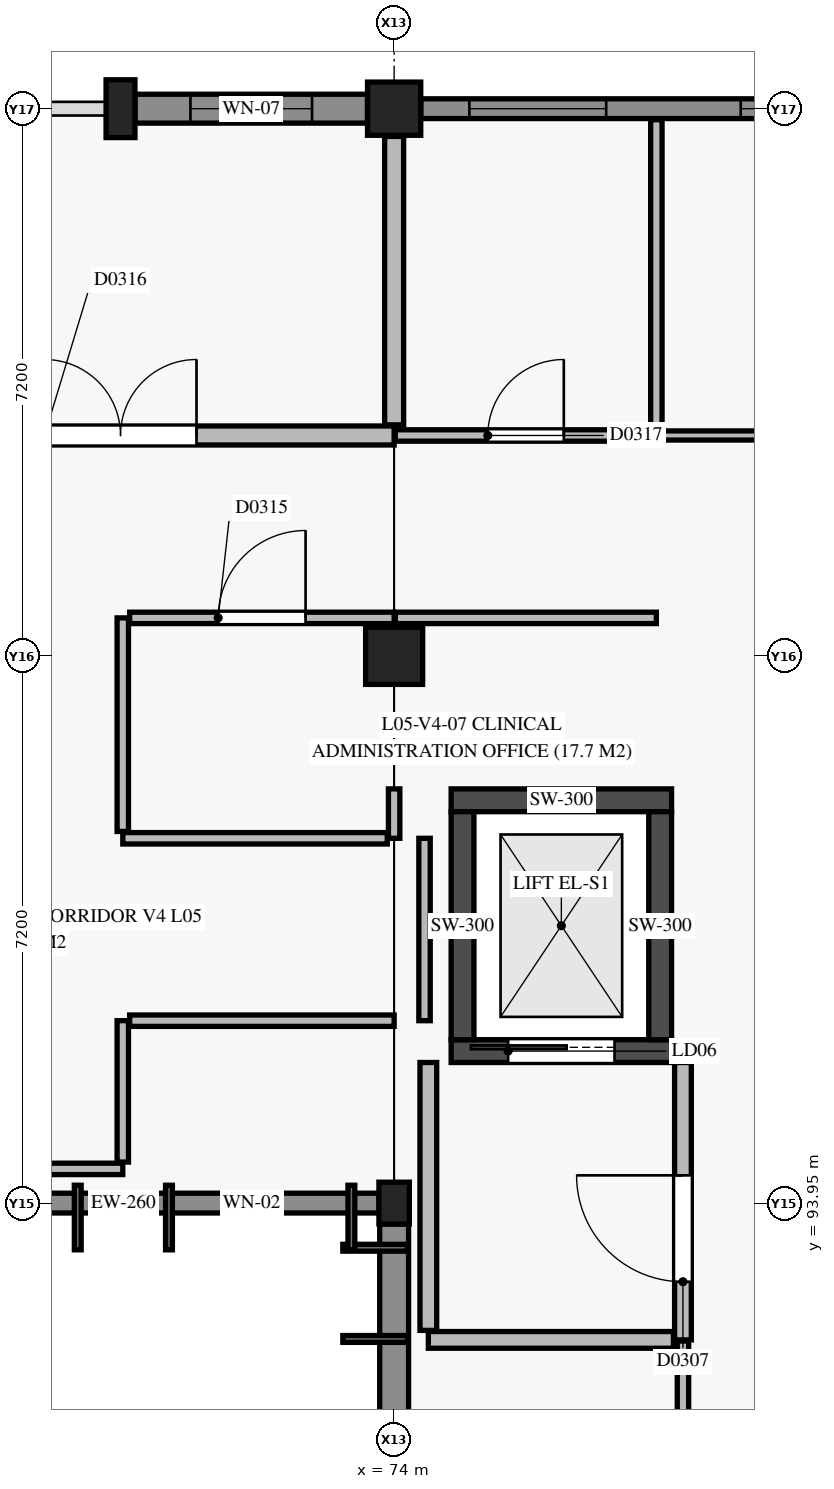
"""IFC4 building model, lengths in metres.
Left out: names, types, materials, properties, quantities, classifications, styles, units other than length and angle.
Written with IfcOpenShell. Run it as: python <this file> out.ifc"""

import sys

from ifc_helpers import new_model, si_unit, direction, frame, frame_2d, origin, origin_2d, place, context, subcontext, project, spatial, rectangle, extrude, element, fill, save


model = new_model("IFC4")
c1 = context("Model", 3, precision=1e-05, world=origin(), true_north=direction((0.0, 1.0)))
c2 = subcontext(c1, "Body", "Model", "MODEL_VIEW")
j1 = project(units=[si_unit("LENGTHUNIT", "METRE"), si_unit("PLANEANGLEUNIT", "RADIAN")], contexts=[c1])
p1 = place(None, origin())
s1 = spatial("IfcSite", under=j1, at=p1, CompositionType="ELEMENT")
p2 = place(p1, origin())
s2 = spatial("IfcBuilding", under=s1, at=p2, CompositionType="ELEMENT")
p3 = place(p2, frame((0.0, 0.0, 21.6)))
s3 = spatial("IfcBuildingStorey", under=s2, at=p3, CompositionType="ELEMENT", Elevation=21.6)
p4 = place(p3, frame((74.0, 93.95, 0.0), z_axis=(0.0, 0.0, 1.0), x_axis=(1.0, 0.0, 0.0)))
e1 = element("IfcColumn", 1, at=p4, inside=s3, PredefinedType="COLUMN", context=c2, shape_type="SweptSolid", body=[
    extrude(rectangle(XDim=0.4, YDim=0.55, at=origin_2d()), origin(), (0.0, 0.0, 1.0), 4.36),
])
p5 = place(p3, frame((74.0, 101.15, 0.0), z_axis=(0.0, 0.0, 1.0), x_axis=(1.0, 0.0, 0.0)))
e2 = element("IfcColumn", 2, at=p5, inside=s3, PredefinedType="COLUMN", context=c2, shape_type="SweptSolid", body=[
    extrude(rectangle(XDim=0.75, YDim=0.75, at=origin_2d()), origin(), (0.0, 0.0, 1.0), 4.05),
])
p6 = place(p3, frame((74.0, 108.35, 0.0), z_axis=(0.0, 0.0, 1.0), x_axis=(1.0, 0.0, 0.0)))
e3 = element("IfcColumn", 3, at=p6, inside=s3, PredefinedType="COLUMN", context=c2, shape_type="SweptSolid", body=[
    extrude(rectangle(XDim=0.7, YDim=0.7, at=origin_2d()), origin(), (0.0, 0.0, 1.0), 4.36),
])
p7 = place(p3, frame((70.4, 108.35, 0.0), z_axis=(0.0, 0.0, 1.0), x_axis=(1.0, 0.0, 0.0)))
e4 = element("IfcColumn", 4, at=p7, inside=s3, PredefinedType="PILASTER", context=c2, shape_type="SweptSolid", body=[
    extrude(rectangle(XDim=0.38, YDim=0.76, at=origin_2d()), origin(), (0.0, 0.0, 1.0), 4.2),
])
p8 = place(p3, frame((74.75, 95.95, 0.0), z_axis=(0.0, 0.0, 1.0), x_axis=(1.0, 0.0, 0.0)))
e5 = element("IfcWall", 5, at=p8, inside=s3, PredefinedType="SHEAR", context=c2, shape_type="SweptSolid", body=[
    extrude(rectangle(XDim=2.9, YDim=0.3, at=frame_2d((1.45, 0.0))), origin(), (0.0, 0.0, 1.0), 3.95),
])
p9 = place(p8, frame((0.75, 0.0, 0.0)))
e6 = element("IfcOpeningElement", 6, at=p9, cuts=e5, PredefinedType="OPENING", context=c2, shape_type="SweptSolid", body=[
    extrude(rectangle(XDim=1.4, YDim=2.15, at=frame_2d((0.7, 1.075))), frame((0.0, 0.16, 0.0), z_axis=(0.0, -1.0, 0.0), x_axis=(1.0, 0.0, 0.0)), (0.0, 0.0, 1.0), 0.32),
])
p10 = place(p3, frame((74.75, 99.25, 0.0), z_axis=(0.0, 0.0, 1.0), x_axis=(1.0, 0.0, 0.0)))
e7 = element("IfcWall", 7, at=p10, inside=s3, PredefinedType="SHEAR", context=c2, shape_type="SweptSolid", body=[
    extrude(rectangle(XDim=2.9, YDim=0.3, at=frame_2d((1.45, 0.0))), origin(), (0.0, 0.0, 1.0), 3.95),
])
for number, where, z_axis, x_axis in (
    (8, (74.9, 96.1, 0.0), (0.0, 0.0, 1.0), (0.0, 1.0, 0.0)),
    (9, (77.5, 96.1, 0.0), (0.0, 0.0, 1.0), (0.0, 1.0, 0.0)),
):
    element("IfcWall", number, at=place(p3, frame(where, z_axis=z_axis, x_axis=x_axis)), inside=s3, PredefinedType="SHEAR", context=c2, shape_type="SweptSolid", body=[
        extrude(rectangle(XDim=3.0, YDim=0.3, at=frame_2d((1.5, 0.0))), origin(), (0.0, 0.0, 1.0), 3.95),
    ])
p11 = place(p3, frame((74.0, 87.05, 0.0), z_axis=(0.0, 0.0, 1.0), x_axis=(0.0, 1.0, 0.0)))
e10 = element("IfcWall", 10, at=p11, inside=s3, PredefinedType="USERDEFINED", context=c2, shape_type="SweptSolid", body=[
    extrude(rectangle(XDim=6.625, YDim=0.38, at=frame_2d((3.312, 0.0))), origin(), (0.0, 0.0, 1.0), 3.38),
])
p12 = place(p11, frame((2.24, 0.0, 0.9)))
e11 = element("IfcOpeningElement", 11, at=p12, cuts=e10, PredefinedType="OPENING", context=c2, shape_type="SweptSolid", body=[
    extrude(rectangle(XDim=0.6, YDim=1.8, at=frame_2d((0.3, 0.9))), frame((0.0, 0.2, 0.0), z_axis=(0.0, -1.0, 0.0), x_axis=(1.0, 0.0, 0.0)), (0.0, 0.0, 1.0), 0.4),
])
p13 = place(p3, frame((73.8, 93.95, 0.0), z_axis=(0.0, 0.0, 1.0), x_axis=(-1.0, 0.0, 0.0)))
e12 = element("IfcWall", 12, at=p13, inside=s3, PredefinedType="SOLIDWALL", context=c2, shape_type="SweptSolid", body=[
    extrude(rectangle(XDim=6.725, YDim=0.26, at=frame_2d((3.363, 0.0))), origin(), (0.0, 0.0, 1.0), 3.37),
])
p14 = place(p13, frame((1.3, 0.0, 0.9)))
e13 = element("IfcOpeningElement", 13, at=p14, cuts=e12, PredefinedType="OPENING", context=c2, shape_type="SweptSolid", body=[
    extrude(rectangle(XDim=0.75, YDim=1.8, at=frame_2d((0.375, 0.9))), frame((0.0, 0.14, 0.0), z_axis=(0.0, -1.0, 0.0), x_axis=(1.0, 0.0, 0.0)), (0.0, 0.0, 1.0), 0.28),
])
p15 = place(p13, frame((4.607, 0.0, 0.9)))
e14 = element("IfcOpeningElement", 14, at=p15, cuts=e12, PredefinedType="OPENING", context=c2, shape_type="SweptSolid", body=[
    extrude(rectangle(XDim=0.9, YDim=1.8, at=frame_2d((0.45, 0.9))), frame((0.0, 0.14, 0.0), z_axis=(0.0, -1.0, 0.0), x_axis=(1.0, 0.0, 0.0)), (0.0, 0.0, 1.0), 0.28),
])
p16 = place(p3, frame((70.59, 108.35, 0.0), z_axis=(0.0, 0.0, 1.0), x_axis=(1.0, 0.0, 0.0)))
e15 = element("IfcWall", 15, at=p16, inside=s3, PredefinedType="USERDEFINED", context=c2, shape_type="SweptSolid", body=[
    extrude(rectangle(XDim=3.06, YDim=0.38, at=frame_2d((1.53, 0.0))), origin(), (0.0, 0.0, 1.0), 3.38),
])
p17 = place(p16, frame((0.73, 0.0, 0.9)))
e16 = element("IfcOpeningElement", 16, at=p17, cuts=e15, PredefinedType="OPENING", context=c2, shape_type="SweptSolid", body=[
    extrude(rectangle(XDim=1.6, YDim=1.8, at=frame_2d((0.8, 0.9))), frame((0.0, 0.2, 0.0), z_axis=(0.0, -1.0, 0.0), x_axis=(1.0, 0.0, 0.0)), (0.0, 0.0, 1.0), 0.4),
])
p18 = place(p3, frame((74.35, 108.35, 0.0), z_axis=(0.0, 0.0, 1.0), x_axis=(1.0, 0.0, 0.0)))
e17 = element("IfcWall", 17, at=p18, inside=s3, PredefinedType="SOLIDWALL", context=c2, shape_type="SweptSolid", body=[
    extrude(rectangle(XDim=6.5, YDim=0.26, at=frame_2d((3.25, 0.0))), origin(), (0.0, 0.0, 1.0), 3.38),
])
p19 = place(p18, frame((0.64, 0.0, 0.9)))
e18 = element("IfcOpeningElement", 18, at=p19, cuts=e17, PredefinedType="OPENING", context=c2, shape_type="SweptSolid", body=[
    extrude(rectangle(XDim=1.8, YDim=1.8, at=frame_2d((0.9, 0.9))), frame((0.0, 0.14, 0.0), z_axis=(0.0, -1.0, 0.0), x_axis=(1.0, 0.0, 0.0)), (0.0, 0.0, 1.0), 0.28),
])
p20 = place(p18, frame((4.21, 0.0, 0.9)))
e19 = element("IfcOpeningElement", 19, at=p20, cuts=e17, PredefinedType="OPENING", context=c2, shape_type="SweptSolid", body=[
    extrude(rectangle(XDim=1.2, YDim=1.5, at=frame_2d((0.6, 0.75))), frame((0.0, 0.14, 0.0), z_axis=(0.0, -1.0, 0.0), x_axis=(1.0, 0.0, 0.0)), (0.0, 0.0, 1.0), 0.28),
])
p21 = place(p3, frame((77.8, 92.15, 0.0), z_axis=(0.0, 0.0, 1.0), x_axis=(0.0, 1.0, 0.0)))
e20 = element("IfcWall", 20, at=p21, inside=s3, PredefinedType="PARTITIONING", context=c2, shape_type="SweptSolid", body=[
    extrude(rectangle(XDim=3.65, YDim=0.22, at=frame_2d((1.825, 0.0))), origin(), (0.0, 0.0, 1.0), 3.37),
])
p22 = place(p21, frame((0.765, 0.0, 0.0)))
e21 = element("IfcOpeningElement", 21, at=p22, cuts=e20, PredefinedType="OPENING", context=c2, shape_type="SweptSolid", body=[
    extrude(rectangle(XDim=1.4, YDim=2.2, at=frame_2d((0.7, 1.1))), frame((0.0, 0.12, 0.0), z_axis=(0.0, -1.0, 0.0), x_axis=(1.0, 0.0, 0.0)), (0.0, 0.0, 1.0), 0.24),
])
p23 = place(p3, frame((74.45, 92.15, 0.0), z_axis=(0.0, 0.0, 1.0), x_axis=(1.0, 0.0, 0.0)))
e22 = element("IfcWall", 22, at=p23, inside=s3, PredefinedType="PARTITIONING", context=c2, shape_type="SweptSolid", body=[
    extrude(rectangle(XDim=3.225, YDim=0.22, at=frame_2d((1.613, 0.0))), origin(), (0.0, 0.0, 1.0), 3.95),
])
p24 = place(p3, frame((74.45, 92.275, 0.0), z_axis=(0.0, 0.0, 1.0), x_axis=(0.0, 1.0, 0.0)))
e23 = element("IfcWall", 23, at=p24, inside=s3, PredefinedType="PARTITIONING", context=c2, shape_type="SweptSolid", body=[
    extrude(rectangle(XDim=3.525, YDim=0.22, at=frame_2d((1.763, 0.0))), origin(), (0.0, 0.0, 1.0), 3.37),
])
p25 = place(p3, frame((66.8, 104.05, 0.0), z_axis=(0.0, 0.0, 1.0), x_axis=(1.0, 0.0, 0.0)))
e24 = element("IfcWall", 24, at=p25, inside=s3, PredefinedType="PARTITIONING", context=c2, shape_type="SweptSolid", body=[
    extrude(rectangle(XDim=7.2, YDim=0.25, at=frame_2d((3.6, 0.0))), origin(), (0.0, 0.0, 1.0), 3.22),
])
p26 = place(p25, frame((2.6, 0.0, 0.0)))
e25 = element("IfcOpeningElement", 25, at=p26, cuts=e24, PredefinedType="OPENING", context=c2, shape_type="SweptSolid", body=[
    extrude(rectangle(XDim=2.0, YDim=2.4, at=frame_2d((1.0, 1.2))), frame((0.0, 0.135, 0.0), z_axis=(0.0, -1.0, 0.0), x_axis=(1.0, 0.0, 0.0)), (0.0, 0.0, 1.0), 0.27),
])
p27 = place(p3, frame((68.12, 94.4, 0.0), z_axis=(0.0, 0.0, 1.0), x_axis=(1.0, 0.0, 0.0)))
e26 = element("IfcWall", 26, at=p27, inside=s3, PredefinedType="PARTITIONING", context=c2, shape_type="SweptSolid", body=[
    extrude(rectangle(XDim=2.31, YDim=0.15, at=frame_2d((1.155, 0.0))), origin(), (0.0, 0.0, 1.0), 3.95),
])
p28 = place(p3, frame((70.43, 94.49, 0.0), z_axis=(0.0, 0.0, 1.0), x_axis=(0.0, 1.0, 0.0)))
e27 = element("IfcWall", 27, at=p28, inside=s3, PredefinedType="PARTITIONING", context=c2, shape_type="SweptSolid", body=[
    extrude(rectangle(XDim=1.86, YDim=0.15, at=frame_2d((0.93, 0.0))), origin(), (0.0, 0.0, 1.0), 3.95),
])
p29 = place(p3, frame((70.52, 96.35, 0.0), z_axis=(0.0, 0.0, 1.0), x_axis=(1.0, 0.0, 0.0)))
e28 = element("IfcWall", 28, at=p29, inside=s3, PredefinedType="PARTITIONING", context=c2, shape_type="SweptSolid", body=[
    extrude(rectangle(XDim=3.48, YDim=0.15, at=frame_2d((1.74, 0.0))), origin(), (0.0, 0.0, 1.0), 3.47),
])
p30 = place(p3, frame((74.4, 96.35, 0.0), z_axis=(0.0, 0.0, 1.0), x_axis=(0.0, 1.0, 0.0)))
e29 = element("IfcWall", 29, at=p30, inside=s3, PredefinedType="PARTITIONING", context=c2, shape_type="SweptSolid", body=[
    extrude(rectangle(XDim=2.4, YDim=0.15, at=frame_2d((1.2, 0.0))), origin(), (0.0, 0.0, 1.0), 3.95),
])
p31 = place(p3, frame((74.0, 98.75, 0.0), z_axis=(0.0, 0.0, 1.0), x_axis=(0.0, 1.0, 0.0)))
e30 = element("IfcWall", 30, at=p31, inside=s3, PredefinedType="PARTITIONING", context=c2, shape_type="SweptSolid", body=[
    extrude(rectangle(XDim=0.65, YDim=0.15, at=frame_2d((0.325, 0.0))), origin(), (0.0, 0.0, 1.0), 3.47),
])
p32 = place(p3, frame((77.8, 76.31, 0.0), z_axis=(0.0, 0.0, 1.0), x_axis=(0.0, 1.0, 0.0)))
e31 = element("IfcWall", 31, at=p32, inside=s3, PredefinedType="PARTITIONING", context=c2, shape_type="SweptSolid", body=[
    extrude(rectangle(XDim=15.825, YDim=0.15, at=frame_2d((7.913, 0.0))), origin(), (0.0, 0.0, 1.0), 3.22),
])
p33 = place(p32, frame((7.337, 0.0, 0.0)))
e32 = element("IfcOpeningElement", 32, at=p33, cuts=e31, PredefinedType="OPENING", context=c2, shape_type="SweptSolid", body=[
    extrude(rectangle(XDim=1.15, YDim=2.15, at=frame_2d((0.575, 1.075))), frame((0.0, 0.085, 0.0), z_axis=(0.0, -1.0, 0.0), x_axis=(1.0, 0.0, 0.0)), (0.0, 0.0, 1.0), 0.17),
])
p34 = place(p3, frame((70.43, 98.75, 0.0), z_axis=(0.0, 0.0, 1.0), x_axis=(1.0, 0.0, 0.0)))
e33 = element("IfcWall", 33, at=p34, inside=s3, PredefinedType="PARTITIONING", context=c2, shape_type="SweptSolid", body=[
    extrude(rectangle(XDim=3.48, YDim=0.15, at=frame_2d((1.74, 0.0))), origin(), (0.0, 0.0, 1.0), 3.95),
])
p35 = place(p3, frame((70.43, 98.84, 0.0), z_axis=(0.0, 0.0, 1.0), x_axis=(0.0, 1.0, 0.0)))
e34 = element("IfcWall", 34, at=p35, inside=s3, PredefinedType="PARTITIONING", context=c2, shape_type="SweptSolid", body=[
    extrude(rectangle(XDim=2.81, YDim=0.15, at=frame_2d((1.405, 0.0))), origin(), (0.0, 0.0, 1.0), 3.54),
])
p36 = place(p3, frame((70.52, 101.65, 0.0), z_axis=(0.0, 0.0, 1.0), x_axis=(1.0, 0.0, 0.0)))
e35 = element("IfcWall", 35, at=p36, inside=s3, PredefinedType="PARTITIONING", context=c2, shape_type="SweptSolid", body=[
    extrude(rectangle(XDim=3.48, YDim=0.15, at=frame_2d((1.74, 0.0))), origin(), (0.0, 0.0, 1.0), 3.22),
])
p37 = place(p36, frame((1.165, 0.0, 0.0)))
e36 = element("IfcOpeningElement", 36, at=p37, cuts=e35, PredefinedType="OPENING", context=c2, shape_type="SweptSolid", body=[
    extrude(rectangle(XDim=1.15, YDim=2.15, at=frame_2d((0.575, 1.075))), frame((0.0, 0.085, 0.0), z_axis=(0.0, -1.0, 0.0), x_axis=(1.0, 0.0, 0.0)), (0.0, 0.0, 1.0), 0.17),
])
p38 = place(p3, frame((74.015, 101.65, 0.0), z_axis=(0.0, 0.0, 1.0), x_axis=(1.0, 0.0, 0.0)))
e37 = element("IfcWall", 37, at=p38, inside=s3, PredefinedType="PARTITIONING", context=c2, shape_type="SweptSolid", body=[
    extrude(rectangle(XDim=3.435, YDim=0.15, at=frame_2d((1.718, 0.0))), origin(), (0.0, 0.0, 1.0), 3.22),
])
p39 = place(p3, frame((74.015, 104.05, 0.0), z_axis=(0.0, 0.0, 1.0), x_axis=(1.0, 0.0, 0.0)))
e38 = element("IfcWall", 38, at=p39, inside=s3, PredefinedType="PARTITIONING", context=c2, shape_type="SweptSolid", body=[
    extrude(rectangle(XDim=3.435, YDim=0.15, at=frame_2d((1.718, 0.0))), origin(), (0.0, 0.0, 1.0), 3.22),
])
p40 = place(p39, frame((1.218, 0.0, 0.0)))
e39 = element("IfcOpeningElement", 39, at=p40, cuts=e38, PredefinedType="OPENING", context=c2, shape_type="SweptSolid", body=[
    extrude(rectangle(XDim=1.0, YDim=2.15, at=frame_2d((0.5, 1.075))), frame((0.0, 0.085, 0.0), z_axis=(0.0, -1.0, 0.0), x_axis=(1.0, 0.0, 0.0)), (0.0, 0.0, 1.0), 0.17),
])
p41 = place(p3, frame((77.465, 104.05, 0.0), z_axis=(0.0, 0.0, 1.0), x_axis=(1.0, 0.0, 0.0)))
e40 = element("IfcWall", 40, at=p41, inside=s3, PredefinedType="PARTITIONING", context=c2, shape_type="SweptSolid", body=[
    extrude(rectangle(XDim=3.735, YDim=0.12, at=frame_2d((1.867, 0.0))), origin(), (0.0, 0.0, 1.0), 3.44),
])
p42 = place(p41, frame((1.393, 0.0, 0.0)))
e41 = element("IfcOpeningElement", 41, at=p42, cuts=e40, PredefinedType="OPENING", context=c2, shape_type="SweptSolid", body=[
    extrude(rectangle(XDim=0.95, YDim=2.1, at=frame_2d((0.475, 1.05))), frame((0.0, 0.07, 0.0), z_axis=(0.0, -1.0, 0.0), x_axis=(1.0, 0.0, 0.0)), (0.0, 0.0, 1.0), 0.14),
])
p43 = place(p3, frame((74.0, 104.19, 0.0), z_axis=(0.0, 0.0, 1.0), x_axis=(0.0, 1.0, 0.0)))
e42 = element("IfcWall", 42, at=p43, inside=s3, PredefinedType="PARTITIONING", context=c2, shape_type="SweptSolid", body=[
    extrude(rectangle(XDim=3.795, YDim=0.25, at=frame_2d((1.897, 0.0))), origin(), (0.0, 0.0, 1.0), 3.22),
])
p44 = place(p3, frame((77.45, 104.14, 0.0), z_axis=(0.0, 0.0, 1.0), x_axis=(0.0, 1.0, 0.0)))
e43 = element("IfcWall", 43, at=p44, inside=s3, PredefinedType="PARTITIONING", context=c2, shape_type="SweptSolid", body=[
    extrude(rectangle(XDim=4.065, YDim=0.15, at=frame_2d((2.033, 0.0))), origin(), (0.0, 0.0, 1.0), 3.95),
])
p45 = place(p14, origin())
e44 = element("IfcWindow", 44, at=p45, inside=s3, PartitioningType="SINGLE_PANEL", PredefinedType="WINDOW", context=c2, shape_type="SweptSolid", body=[
    extrude(rectangle(XDim=0.75, YDim=1.8, at=frame_2d((0.375, 0.9))), frame((0.0, 0.03, 0.0), z_axis=(0.0, -1.0, 0.0), x_axis=(1.0, 0.0, 0.0)), (0.0, 0.0, 1.0), 0.06),
])
fill(e13, e44)
p46 = place(p17, origin())
e45 = element("IfcWindow", 45, at=p46, inside=s3, PartitioningType="SINGLE_PANEL", PredefinedType="WINDOW", context=c2, shape_type="SweptSolid", body=[
    extrude(rectangle(XDim=1.6, YDim=1.8, at=frame_2d((0.8, 0.9))), frame((0.0, 0.03, 0.0), z_axis=(0.0, -1.0, 0.0), x_axis=(1.0, 0.0, 0.0)), (0.0, 0.0, 1.0), 0.06),
])
fill(e16, e45)
p47 = place(p19, origin())
e46 = element("IfcWindow", 46, at=p47, inside=s3, PartitioningType="SINGLE_PANEL", PredefinedType="WINDOW", context=c2, shape_type="SweptSolid", body=[
    extrude(rectangle(XDim=1.8, YDim=1.8, at=frame_2d((0.9, 0.9))), frame((0.0, 0.03, 0.0), z_axis=(0.0, -1.0, 0.0), x_axis=(1.0, 0.0, 0.0)), (0.0, 0.0, 1.0), 0.06),
])
fill(e18, e46)
p48 = place(p20, origin())
e47 = element("IfcWindow", 47, at=p48, inside=s3, PartitioningType="SINGLE_PANEL", PredefinedType="WINDOW", context=c2, shape_type="SweptSolid", body=[
    extrude(rectangle(XDim=1.2, YDim=1.5, at=frame_2d((0.6, 0.75))), frame((0.0, 0.03, 0.0), z_axis=(0.0, -1.0, 0.0), x_axis=(1.0, 0.0, 0.0)), (0.0, 0.0, 1.0), 0.06),
])
fill(e19, e47)
p49 = place(p9, origin())
e48 = element("IfcDoor", 48, at=p49, inside=s3, OperationType="SLIDING_TO_LEFT", PredefinedType="DOOR", context=c2, shape_type="SweptSolid", body=[
    extrude(rectangle(XDim=1.4, YDim=2.15, at=frame_2d((0.7, 1.075))), frame((0.0, 0.025, 0.0), z_axis=(0.0, -1.0, 0.0), x_axis=(1.0, 0.0, 0.0)), (0.0, 0.0, 1.0), 0.05),
])
fill(e6, e48)
p50 = place(p22, origin())
e49 = element("IfcDoor", 49, at=p50, inside=s3, OperationType="SINGLE_SWING_RIGHT", PredefinedType="DOOR", context=c2, shape_type="SweptSolid", body=[
    extrude(rectangle(XDim=1.4, YDim=2.2, at=frame_2d((0.7, 1.1))), frame((0.0, 0.025, 0.0), z_axis=(0.0, -1.0, 0.0), x_axis=(1.0, 0.0, 0.0)), (0.0, 0.0, 1.0), 0.05),
])
fill(e21, e49)
p51 = place(p37, origin())
e50 = element("IfcDoor", 50, at=p51, inside=s3, OperationType="SINGLE_SWING_RIGHT", PredefinedType="DOOR", context=c2, shape_type="SweptSolid", body=[
    extrude(rectangle(XDim=1.15, YDim=2.15, at=frame_2d((0.575, 1.075))), frame((0.0, 0.025, 0.0), z_axis=(0.0, -1.0, 0.0), x_axis=(1.0, 0.0, 0.0)), (0.0, 0.0, 1.0), 0.05),
])
fill(e36, e50)
p52 = place(p26, origin())
e51 = element("IfcDoor", 51, at=p52, inside=s3, OperationType="DOUBLE_DOOR_SINGLE_SWING", PredefinedType="DOOR", context=c2, shape_type="SweptSolid", body=[
    extrude(rectangle(XDim=2.0, YDim=2.4, at=frame_2d((1.0, 1.2))), frame((0.0, 0.025, 0.0), z_axis=(0.0, -1.0, 0.0), x_axis=(1.0, 0.0, 0.0)), (0.0, 0.0, 1.0), 0.05),
])
fill(e25, e51)
p53 = place(p40, origin())
e52 = element("IfcDoor", 52, at=p53, inside=s3, OperationType="SINGLE_SWING_RIGHT", PredefinedType="DOOR", context=c2, shape_type="SweptSolid", body=[
    extrude(rectangle(XDim=1.0, YDim=2.15, at=frame_2d((0.5, 1.075))), frame((0.0, 0.025, 0.0), z_axis=(0.0, -1.0, 0.0), x_axis=(1.0, 0.0, 0.0)), (0.0, 0.0, 1.0), 0.05),
])
fill(e39, e52)
save(model, sys.argv[1])
